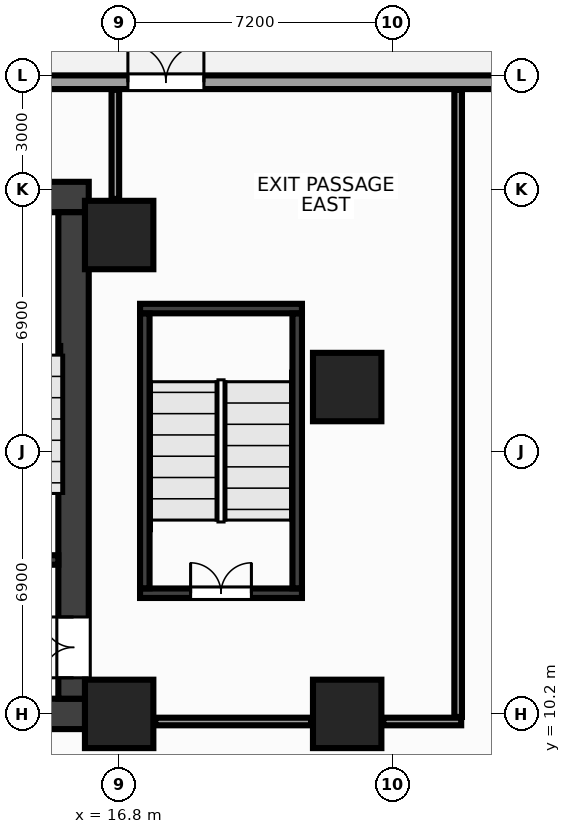
"""IFC4 building model, lengths in metres.
Left out: names, types, materials, properties, quantities, classifications, styles, units other than length and angle.
Written with IfcOpenShell. Run it as: python <this file> out.ifc"""

import sys

from ifc_helpers import new_model, si_unit, direction, frame, frame_2d, origin, origin_2d, place, context, subcontext, project, spatial, rectangle, extrude, source, transform, mapped, element, fill, save


model = new_model("IFC4")
c1 = context("Model", 3, precision=1e-05, world=origin(), true_north=direction((0.0, 1.0)))
c2 = subcontext(c1, "Body", "Model", "MODEL_VIEW")
j1 = project(units=[si_unit("LENGTHUNIT", "METRE"), si_unit("PLANEANGLEUNIT", "RADIAN")], contexts=[c1])
p1 = place(None, origin())
s1 = spatial("IfcSite", under=j1, at=p1, CompositionType="ELEMENT")
p2 = place(p1, origin())
s2 = spatial("IfcBuilding", under=s1, at=p2, CompositionType="ELEMENT")
p3 = place(p2, origin())
s3 = spatial("IfcBuildingStorey", under=s2, at=p3, CompositionType="ELEMENT", Elevation=0.0)
m1 = source(origin(), c2, "Body", "SweptSolid", [
    extrude(rectangle(XDim=32.0, YDim=0.8, at=frame_2d((16.0, 0.0))), origin(), (0.0, 0.0, 1.0), 5.0),
])
p4 = place(p3, frame((-16.0, 23.8, 0.0), z_axis=(0.0, 0.0, 1.0), x_axis=(1.0, 0.0, 0.0)))
e1 = element("IfcWall", 1, at=p4, inside=s3, PredefinedType="SHEAR", context=c2, shape_type="MappedRepresentation", body=[
    mapped(m1, transform((0.0, 0.0, 0.0), x_axis=(1.0, 0.0, 0.0), y_axis=(0.0, 1.0, 0.0), z_axis=(0.0, 0.0, 1.0), scale=1.0)),
])
p5 = place(p3, frame((-16.0, 10.2, 0.0), z_axis=(0.0, 0.0, 1.0), x_axis=(1.0, 0.0, 0.0)))
e2 = element("IfcWall", 2, at=p5, inside=s3, PredefinedType="SHEAR", context=c2, shape_type="MappedRepresentation", body=[
    mapped(m1, transform((0.0, 0.0, 0.0), x_axis=(1.0, 0.0, 0.0), y_axis=(0.0, 1.0, 0.0), z_axis=(0.0, 0.0, 1.0), scale=1.0)),
])
p6 = place(p5, frame((28.55, 0.0, 0.0)))
e3 = element("IfcOpeningElement", 3, at=p6, cuts=e2, PredefinedType="OPENING", context=c2, shape_type="SweptSolid", body=[
    extrude(rectangle(XDim=1.6, YDim=2.15, at=frame_2d((0.8, 1.075))), frame((0.0, 0.412, 0.0), z_axis=(0.0, -1.0, 0.0), x_axis=(1.0, 0.0, 0.0)), (0.0, 0.0, 1.0), 0.824),
])
p7 = place(p5, frame((15.25, 0.0, 0.0)))
e4 = element("IfcOpeningElement", 4, at=p7, cuts=e2, PredefinedType="OPENING", context=c2, shape_type="SweptSolid", body=[
    extrude(rectangle(XDim=1.5, YDim=2.2, at=frame_2d((0.75, 1.1))), frame((0.0, 0.412, 0.0), z_axis=(0.0, -1.0, 0.0), x_axis=(1.0, 0.0, 0.0)), (0.0, 0.0, 1.0), 0.824),
])
m2 = source(origin(), c2, "Body", "SweptSolid", [
    extrude(rectangle(XDim=12.8, YDim=0.8, at=frame_2d((6.4, 0.0))), origin(), (0.0, 0.0, 1.0), 5.0),
])
p8 = place(p3, frame((15.6, 10.6, 0.0), z_axis=(0.0, 0.0, 1.0), x_axis=(0.0, 1.0, 0.0)))
e5 = element("IfcWall", 5, at=p8, inside=s3, PredefinedType="SHEAR", context=c2, shape_type="MappedRepresentation", body=[
    mapped(m2, transform((0.0, 0.0, 0.0), x_axis=(1.0, 0.0, 0.0), y_axis=(0.0, 1.0, 0.0), z_axis=(0.0, 0.0, 1.0), scale=1.0)),
])
p9 = place(p8, frame((0.55, 0.0, 0.0)))
e6 = element("IfcOpeningElement", 6, at=p9, cuts=e5, PredefinedType="OPENING", context=c2, shape_type="SweptSolid", body=[
    extrude(rectangle(XDim=1.6, YDim=2.15, at=frame_2d((0.8, 1.075))), frame((0.0, 0.412, 0.0), z_axis=(0.0, -1.0, 0.0), x_axis=(1.0, 0.0, 0.0)), (0.0, 0.0, 1.0), 0.824),
])
m3 = source(origin(), c2, "Body", "SweptSolid", [
    extrude(rectangle(XDim=3.555, YDim=0.25, at=frame_2d((1.777, 0.0))), origin(), (0.0, 0.0, 1.0), 5.0),
])
p10 = place(p3, frame((11.645, 14.25, 0.0), z_axis=(0.0, 0.0, 1.0), x_axis=(1.0, 0.0, 0.0)))
e7 = element("IfcWall", 7, at=p10, inside=s3, PredefinedType="SHEAR", context=c2, shape_type="MappedRepresentation", body=[
    mapped(m3, transform((0.0, 0.0, 0.0), x_axis=(1.0, 0.0, 0.0), y_axis=(0.0, 1.0, 0.0), z_axis=(0.0, 0.0, 1.0), scale=1.0)),
])
p11 = place(p10, frame((0.95, 0.0, 0.0)))
e8 = element("IfcOpeningElement", 8, at=p11, cuts=e7, PredefinedType="OPENING", context=c2, shape_type="SweptSolid", body=[
    extrude(rectangle(XDim=1.6, YDim=2.15, at=frame_2d((0.8, 1.075))), frame((0.0, 0.137, 0.0), z_axis=(0.0, -1.0, 0.0), x_axis=(1.0, 0.0, 0.0)), (0.0, 0.0, 1.0), 0.274),
])
m4 = source(origin(), c2, "Body", "SweptSolid", [
    extrude(rectangle(XDim=4.26, YDim=0.25, at=frame_2d((2.13, 0.0))), origin(), (0.0, 0.0, 1.0), 5.0),
])
p12 = place(p3, frame((17.35, 20.865, 0.0), z_axis=(0.0, 0.0, 1.0), x_axis=(1.0, 0.0, 0.0)))
e9 = element("IfcWall", 9, at=p12, inside=s3, PredefinedType="SHEAR", context=c2, shape_type="MappedRepresentation", body=[
    mapped(m4, transform((0.0, 0.0, 0.0), x_axis=(1.0, 0.0, 0.0), y_axis=(0.0, 1.0, 0.0), z_axis=(0.0, 0.0, 1.0), scale=1.0)),
])
p13 = place(p3, frame((17.35, 13.375, 0.0), z_axis=(0.0, 0.0, 1.0), x_axis=(1.0, 0.0, 0.0)))
e10 = element("IfcWall", 10, at=p13, inside=s3, PredefinedType="SHEAR", context=c2, shape_type="MappedRepresentation", body=[
    mapped(m4, transform((0.0, 0.0, 0.0), x_axis=(1.0, 0.0, 0.0), y_axis=(0.0, 1.0, 0.0), z_axis=(0.0, 0.0, 1.0), scale=1.0)),
])
p14 = place(p13, frame((1.33, 0.0, 0.0)))
e11 = element("IfcOpeningElement", 11, at=p14, cuts=e10, PredefinedType="OPENING", context=c2, shape_type="SweptSolid", body=[
    extrude(rectangle(XDim=1.6, YDim=2.15, at=frame_2d((0.8, 1.075))), frame((0.0, 0.137, 0.0), z_axis=(0.0, -1.0, 0.0), x_axis=(1.0, 0.0, 0.0)), (0.0, 0.0, 1.0), 0.274),
])
m5 = source(origin(), c2, "Body", "SweptSolid", [
    extrude(rectangle(XDim=7.23, YDim=0.25, at=frame_2d((3.615, 0.0))), origin(), (0.0, 0.0, 1.0), 5.0),
])
for number, where, z_axis, x_axis in (
    (12, (17.475, 13.505, 0.0), (0.0, 0.0, 1.0), (0.0, 1.0, 0.0)),
    (13, (21.485, 13.505, 0.0), (0.0, 0.0, 1.0), (0.0, 1.0, 0.0)),
):
    element("IfcWall", number, at=place(p3, frame(where, z_axis=z_axis, x_axis=x_axis)), inside=s3, PredefinedType="SHEAR", context=c2, shape_type="MappedRepresentation", body=[
        mapped(m5, transform((0.0, 0.0, 0.0), x_axis=(1.0, 0.0, 0.0), y_axis=(0.0, 1.0, 0.0), z_axis=(0.0, 0.0, 1.0), scale=1.0)),
    ])
m6 = source(origin(), c2, "Body", "SweptSolid", [
    extrude(rectangle(XDim=1.8, YDim=1.8, at=origin_2d()), origin(), (0.0, 0.0, 1.0), 5.0),
])
for number, where, z_axis, x_axis in (
    (14, (16.8, 10.2, 0.0), (0.0, 0.0, 1.0), (1.0, 0.0, 0.0)),
    (15, (16.8, 22.8, 0.0), (0.0, 0.0, 1.0), (1.0, 0.0, 0.0)),
    (16, (22.8, 10.2, 0.0), (0.0, 0.0, 1.0), (1.0, 0.0, 0.0)),
    (17, (22.8, 18.8, 0.0), (0.0, 0.0, 1.0), (1.0, 0.0, 0.0)),
):
    element("IfcColumn", number, at=place(p3, frame(where, z_axis=z_axis, x_axis=x_axis)), inside=s3, PredefinedType="COLUMN", context=c2, shape_type="MappedRepresentation", body=[
        mapped(m6, transform((0.0, 0.0, 0.0), x_axis=(1.0, 0.0, 0.0), y_axis=(0.0, 1.0, 0.0), z_axis=(0.0, 0.0, 1.0), scale=1.0)),
    ])
m7 = source(origin(), c2, "Body", "SweptSolid", [
    extrude(rectangle(XDim=85.64, YDim=0.36, at=frame_2d((42.82, 0.0))), origin(), (0.0, 0.0, 1.0), 4.22),
])
p15 = place(p3, frame((-42.82, 26.82, 0.0), z_axis=(0.0, 0.0, 1.0), x_axis=(1.0, 0.0, 0.0)))
e18 = element("IfcWall", 18, at=p15, inside=s3, PredefinedType="STANDARD", context=c2, shape_type="MappedRepresentation", body=[
    mapped(m7, transform((0.0, 0.0, 0.0), x_axis=(1.0, 0.0, 0.0), y_axis=(0.0, 1.0, 0.0), z_axis=(0.0, 0.0, 1.0), scale=1.0)),
])
p16 = place(p15, frame((23.85, 0.0, 0.0)))
e19 = element("IfcOpeningElement", 19, at=p16, cuts=e18, PredefinedType="OPENING", context=c2, shape_type="SweptSolid", body=[
    extrude(rectangle(XDim=2.0, YDim=2.3, at=frame_2d((1.0, 1.15))), frame((0.0, 0.192, 0.0), z_axis=(0.0, -1.0, 0.0), x_axis=(1.0, 0.0, 0.0)), (0.0, 0.0, 1.0), 0.384),
])
p17 = place(p15, frame((59.85, 0.0, 0.0)))
e20 = element("IfcOpeningElement", 20, at=p17, cuts=e18, PredefinedType="OPENING", context=c2, shape_type="SweptSolid", body=[
    extrude(rectangle(XDim=2.0, YDim=2.3, at=frame_2d((1.0, 1.15))), frame((0.0, 0.192, 0.0), z_axis=(0.0, -1.0, 0.0), x_axis=(1.0, 0.0, 0.0)), (0.0, 0.0, 1.0), 0.384),
])
p18 = place(p15, frame((74.4, 0.0, 0.0)))
e21 = element("IfcOpeningElement", 21, at=p18, cuts=e18, PredefinedType="OPENING", context=c2, shape_type="SweptSolid", body=[
    extrude(rectangle(XDim=6.6, YDim=3.2, at=frame_2d((3.3, 1.6))), frame((0.0, 0.192, 0.0), z_axis=(0.0, -1.0, 0.0), x_axis=(1.0, 0.0, 0.0)), (0.0, 0.0, 1.0), 0.384),
])
m8 = source(origin(), c2, "Body", "SweptSolid", [
    extrude(rectangle(XDim=16.5, YDim=0.2, at=frame_2d((8.25, 0.0))), origin(), (0.0, 0.0, 1.0), 4.72),
])
p19 = place(p3, frame((25.72, 10.12, 0.0), z_axis=(0.0, 0.0, 1.0), x_axis=(0.0, 1.0, 0.0)))
e22 = element("IfcWall", 22, at=p19, inside=s3, PredefinedType="PARTITIONING", context=c2, shape_type="MappedRepresentation", body=[
    mapped(m8, transform((0.0, 0.0, 0.0), x_axis=(1.0, 0.0, 0.0), y_axis=(0.0, 1.0, 0.0), z_axis=(0.0, 0.0, 1.0), scale=1.0)),
])
m9 = source(origin(), c2, "Body", "SweptSolid", [
    extrude(rectangle(XDim=4.1, YDim=0.2, at=frame_2d((2.05, 0.0))), origin(), (0.0, 0.0, 1.0), 4.105),
])
p20 = place(p3, frame((17.75, 10.0, 0.0), z_axis=(0.0, 0.0, 1.0), x_axis=(1.0, 0.0, 0.0)))
e23 = element("IfcWall", 23, at=p20, inside=s3, PredefinedType="PARTITIONING", context=c2, shape_type="MappedRepresentation", body=[
    mapped(m9, transform((0.0, 0.0, 0.0), x_axis=(1.0, 0.0, 0.0), y_axis=(0.0, 1.0, 0.0), z_axis=(0.0, 0.0, 1.0), scale=1.0)),
])
m10 = source(origin(), c2, "Body", "SweptSolid", [
    extrude(rectangle(XDim=2.05, YDim=0.2, at=frame_2d((1.025, 0.0))), origin(), (0.0, 0.0, 1.0), 4.72),
])
p21 = place(p3, frame((23.75, 10.0, 0.0), z_axis=(0.0, 0.0, 1.0), x_axis=(1.0, 0.0, 0.0)))
e24 = element("IfcWall", 24, at=p21, inside=s3, PredefinedType="PARTITIONING", context=c2, shape_type="MappedRepresentation", body=[
    mapped(m10, transform((0.0, 0.0, 0.0), x_axis=(1.0, 0.0, 0.0), y_axis=(0.0, 1.0, 0.0), z_axis=(0.0, 0.0, 1.0), scale=1.0)),
])
m11 = source(origin(), c2, "Body", "SweptSolid", [
    extrude(rectangle(XDim=2.87, YDim=0.2, at=frame_2d((1.435, 0.0))), origin(), (0.0, 0.0, 1.0), 4.72),
])
p22 = place(p3, frame((16.7, 23.75, 0.0), z_axis=(0.0, 0.0, 1.0), x_axis=(0.0, 1.0, 0.0)))
e25 = element("IfcWall", 25, at=p22, inside=s3, PredefinedType="PARTITIONING", context=c2, shape_type="MappedRepresentation", body=[
    mapped(m11, transform((0.0, 0.0, 0.0), x_axis=(1.0, 0.0, 0.0), y_axis=(0.0, 1.0, 0.0), z_axis=(0.0, 0.0, 1.0), scale=1.0)),
])
m12 = source(origin(), c2, "Body", "SweptSolid", [
    extrude(rectangle(XDim=2.0, YDim=2.3, at=frame_2d((1.0, 1.15))), frame((0.0, 0.025, 0.0), z_axis=(0.0, -1.0, 0.0), x_axis=(1.0, 0.0, 0.0)), (0.0, 0.0, 1.0), 0.05),
])
p23 = place(p17, origin())
e26 = element("IfcDoor", 26, at=p23, inside=s3, OperationType="DOUBLE_DOOR_SINGLE_SWING", PredefinedType="DOOR", context=c2, shape_type="MappedRepresentation", body=[
    mapped(m12, transform((0.0, 0.0, 0.0), x_axis=(1.0, 0.0, 0.0), y_axis=(0.0, 1.0, 0.0), z_axis=(0.0, 0.0, 1.0), scale=1.0)),
])
fill(e20, e26)
m13 = source(origin(), c2, "Body", "SweptSolid", [
    extrude(rectangle(XDim=1.6, YDim=2.15, at=frame_2d((0.8, 1.075))), frame((0.0, 0.025, 0.0), z_axis=(0.0, -1.0, 0.0), x_axis=(1.0, 0.0, 0.0)), (0.0, 0.0, 1.0), 0.05),
])
p24 = place(p9, origin())
e27 = element("IfcDoor", 27, at=p24, inside=s3, OperationType="DOUBLE_DOOR_SINGLE_SWING", PredefinedType="DOOR", context=c2, shape_type="MappedRepresentation", body=[
    mapped(m13, transform((0.0, 0.0, 0.0), x_axis=(1.0, 0.0, 0.0), y_axis=(0.0, 1.0, 0.0), z_axis=(0.0, 0.0, 1.0), scale=1.0)),
])
fill(e6, e27)
p25 = place(p14, origin())
e28 = element("IfcDoor", 28, at=p25, inside=s3, OperationType="DOUBLE_DOOR_SINGLE_SWING", PredefinedType="DOOR", context=c2, shape_type="MappedRepresentation", body=[
    mapped(m13, transform((0.0, 0.0, 0.0), x_axis=(1.0, 0.0, 0.0), y_axis=(0.0, 1.0, 0.0), z_axis=(0.0, 0.0, 1.0), scale=1.0)),
])
fill(e11, e28)
save(model, sys.argv[1])
